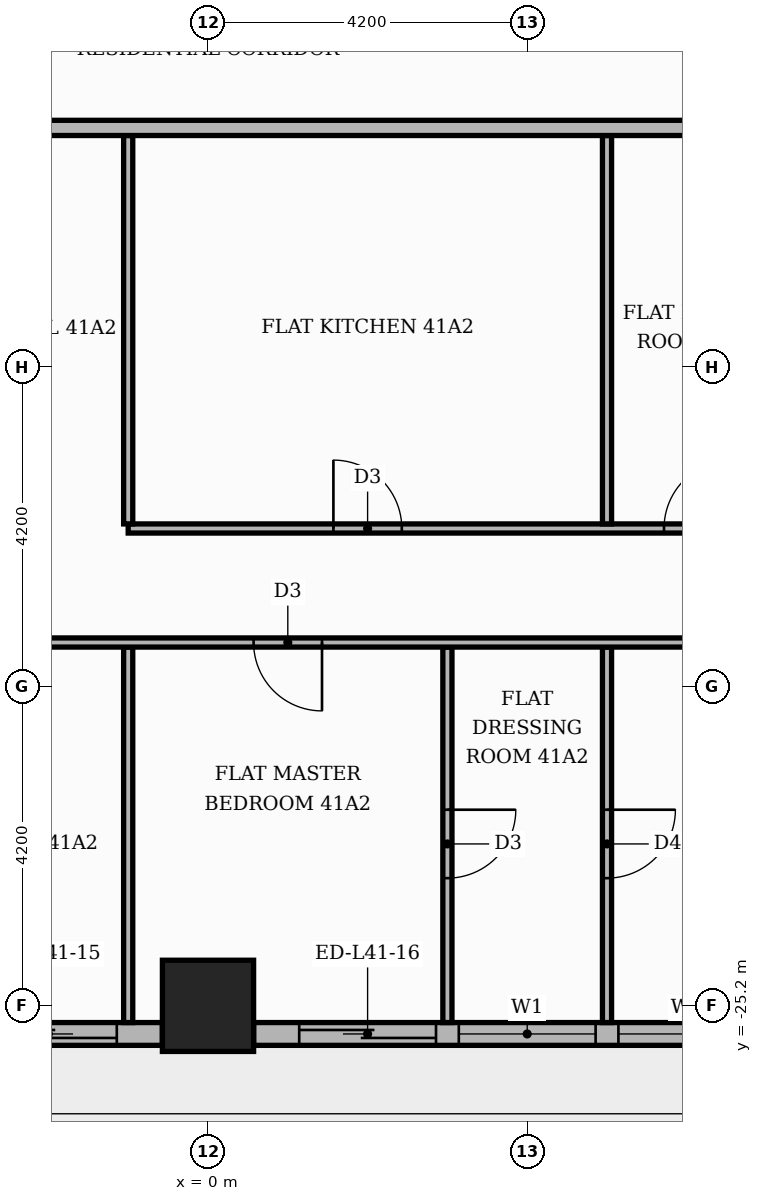
"""IFC4 building model, lengths in metres.
Left out: names, types, materials, properties, quantities, classifications, styles, units other than length and angle.
Written with IfcOpenShell. Run it as: python <this file> out.ifc"""

import sys

from ifc_helpers import new_model, si_unit, direction, frame, frame_2d, origin, origin_2d, place, context, subcontext, project, spatial, rectangle, extrude, element, fill, save


model = new_model("IFC4")
c1 = context("Model", 3, precision=1e-05, world=origin(), true_north=direction((0.0, 1.0)))
c2 = subcontext(c1, "Body", "Model", "MODEL_VIEW")
j1 = project(units=[si_unit("LENGTHUNIT", "METRE"), si_unit("PLANEANGLEUNIT", "RADIAN")], contexts=[c1])
p1 = place(None, origin())
s1 = spatial("IfcSite", under=j1, at=p1, CompositionType="ELEMENT")
p2 = place(p1, origin())
s2 = spatial("IfcBuilding", under=s1, at=p2, CompositionType="ELEMENT")
p3 = place(p2, frame((0.0, 0.0, 172.8)))
s3 = spatial("IfcBuildingStorey", under=s2, at=p3, CompositionType="ELEMENT", Elevation=172.8)
p4 = place(p3, frame((0.0, -25.2, 0.0), z_axis=(0.0, 0.0, 1.0), x_axis=(1.0, 0.0, 0.0)))
e1 = element("IfcColumn", 1, at=p4, inside=s3, PredefinedType="COLUMN", context=c2, shape_type="SweptSolid", body=[
    extrude(rectangle(XDim=1.2, YDim=1.2, at=origin_2d()), origin(), (0.0, 0.0, 1.0), 3.9),
])
p5 = place(p3, frame((-7.8, -25.57, 0.0), z_axis=(0.0, 0.0, 1.0), x_axis=(1.0, 0.0, 0.0)))
e2 = element("IfcWall", 2, at=p5, inside=s3, PredefinedType="STANDARD", context=c2, shape_type="SweptSolid", body=[
    extrude(rectangle(XDim=7.2, YDim=0.3, at=frame_2d((3.6, 0.0))), origin(), (0.0, 0.0, 1.0), 3.48),
])
p6 = place(p5, frame((0.6, 0.0, 0.9)))
e3 = element("IfcOpeningElement", 3, at=p6, cuts=e2, PredefinedType="OPENING", context=c2, shape_type="SweptSolid", body=[
    extrude(rectangle(XDim=1.8, YDim=2.1, at=frame_2d((0.9, 1.05))), frame((0.0, 0.16, 0.0), z_axis=(0.0, -1.0, 0.0), x_axis=(1.0, 0.0, 0.0)), (0.0, 0.0, 1.0), 0.32),
])
p7 = place(p5, frame((2.7, 0.0, 0.9)))
e4 = element("IfcOpeningElement", 4, at=p7, cuts=e2, PredefinedType="OPENING", context=c2, shape_type="SweptSolid", body=[
    extrude(rectangle(XDim=1.8, YDim=2.1, at=frame_2d((0.9, 1.05))), frame((0.0, 0.16, 0.0), z_axis=(0.0, -1.0, 0.0), x_axis=(1.0, 0.0, 0.0)), (0.0, 0.0, 1.0), 0.32),
])
p8 = place(p5, frame((4.8, 0.0, 0.0)))
e5 = element("IfcOpeningElement", 5, at=p8, cuts=e2, PredefinedType="OPENING", context=c2, shape_type="SweptSolid", body=[
    extrude(rectangle(XDim=1.8, YDim=2.4, at=frame_2d((0.9, 1.2))), frame((0.0, 0.16, 0.0), z_axis=(0.0, -1.0, 0.0), x_axis=(1.0, 0.0, 0.0)), (0.0, 0.0, 1.0), 0.32),
])
p9 = place(p3, frame((0.6, -25.57, 0.0), z_axis=(0.0, 0.0, 1.0), x_axis=(1.0, 0.0, 0.0)))
e6 = element("IfcWall", 6, at=p9, inside=s3, PredefinedType="STANDARD", context=c2, shape_type="SweptSolid", body=[
    extrude(rectangle(XDim=7.2, YDim=0.3, at=frame_2d((3.6, 0.0))), origin(), (0.0, 0.0, 1.0), 3.48),
])
p10 = place(p9, frame((0.6, 0.0, 0.0)))
e7 = element("IfcOpeningElement", 7, at=p10, cuts=e6, PredefinedType="OPENING", context=c2, shape_type="SweptSolid", body=[
    extrude(rectangle(XDim=1.8, YDim=2.4, at=frame_2d((0.9, 1.2))), frame((0.0, 0.16, 0.0), z_axis=(0.0, -1.0, 0.0), x_axis=(1.0, 0.0, 0.0)), (0.0, 0.0, 1.0), 0.32),
])
p11 = place(p9, frame((2.7, 0.0, 0.9)))
e8 = element("IfcOpeningElement", 8, at=p11, cuts=e6, PredefinedType="OPENING", context=c2, shape_type="SweptSolid", body=[
    extrude(rectangle(XDim=1.8, YDim=2.1, at=frame_2d((0.9, 1.05))), frame((0.0, 0.16, 0.0), z_axis=(0.0, -1.0, 0.0), x_axis=(1.0, 0.0, 0.0)), (0.0, 0.0, 1.0), 0.32),
])
p12 = place(p9, frame((4.8, 0.0, 0.9)))
e9 = element("IfcOpeningElement", 9, at=p12, cuts=e6, PredefinedType="OPENING", context=c2, shape_type="SweptSolid", body=[
    extrude(rectangle(XDim=1.8, YDim=2.1, at=frame_2d((0.9, 1.05))), frame((0.0, 0.16, 0.0), z_axis=(0.0, -1.0, 0.0), x_axis=(1.0, 0.0, 0.0)), (0.0, 0.0, 1.0), 0.32),
])
p13 = place(p3, frame((-1.05, -25.42, 0.0), z_axis=(0.0, 0.0, 1.0), x_axis=(0.0, 1.0, 0.0)))
e10 = element("IfcWall", 10, at=p13, inside=s3, PredefinedType="PARTITIONING", context=c2, shape_type="SweptSolid", body=[
    extrude(rectangle(XDim=4.94, YDim=0.12, at=frame_2d((2.47, 0.0))), origin(), (0.0, 0.0, 1.0), 3.48),
])
p14 = place(p3, frame((3.15, -25.42, 0.0), z_axis=(0.0, 0.0, 1.0), x_axis=(0.0, 1.0, 0.0)))
e11 = element("IfcWall", 11, at=p14, inside=s3, PredefinedType="PARTITIONING", context=c2, shape_type="SweptSolid", body=[
    extrude(rectangle(XDim=4.94, YDim=0.12, at=frame_2d((2.47, 0.0))), origin(), (0.0, 0.0, 1.0), 3.48),
])
p15 = place(p14, frame((1.9, 0.0, 0.0)))
e12 = element("IfcOpeningElement", 12, at=p15, cuts=e11, PredefinedType="OPENING", context=c2, shape_type="SweptSolid", body=[
    extrude(rectangle(XDim=0.9, YDim=2.1, at=frame_2d((0.45, 1.05))), frame((0.0, 0.07, 0.0), z_axis=(0.0, -1.0, 0.0), x_axis=(1.0, 0.0, 0.0)), (0.0, 0.0, 1.0), 0.14),
])
p16 = place(p3, frame((5.25, -25.42, 0.0), z_axis=(0.0, 0.0, 1.0), x_axis=(0.0, 1.0, 0.0)))
e13 = element("IfcWall", 13, at=p16, inside=s3, PredefinedType="PARTITIONING", context=c2, shape_type="SweptSolid", body=[
    extrude(rectangle(XDim=4.94, YDim=0.12, at=frame_2d((2.47, 0.0))), origin(), (0.0, 0.0, 1.0), 3.48),
])
p17 = place(p16, frame((1.9, 0.0, 0.0)))
e14 = element("IfcOpeningElement", 14, at=p17, cuts=e13, PredefinedType="OPENING", context=c2, shape_type="SweptSolid", body=[
    extrude(rectangle(XDim=0.9, YDim=2.1, at=frame_2d((0.45, 1.05))), frame((0.0, 0.07, 0.0), z_axis=(0.0, -1.0, 0.0), x_axis=(1.0, 0.0, 0.0)), (0.0, 0.0, 1.0), 0.14),
])
p18 = place(p3, frame((-5.15, -20.42, 0.0), z_axis=(0.0, 0.0, 1.0), x_axis=(1.0, 0.0, 0.0)))
e15 = element("IfcWall", 15, at=p18, inside=s3, PredefinedType="PARTITIONING", context=c2, shape_type="SweptSolid", body=[
    extrude(rectangle(XDim=18.7, YDim=0.12, at=frame_2d((9.35, 0.0))), origin(), (0.0, 0.0, 1.0), 3.48),
])
p19 = place(p18, frame((1.5, 0.0, 0.0)))
e16 = element("IfcOpeningElement", 16, at=p19, cuts=e15, PredefinedType="OPENING", context=c2, shape_type="SweptSolid", body=[
    extrude(rectangle(XDim=1.0, YDim=2.1, at=frame_2d((0.5, 1.05))), frame((0.0, 0.07, 0.0), z_axis=(0.0, -1.0, 0.0), x_axis=(1.0, 0.0, 0.0)), (0.0, 0.0, 1.0), 0.14),
])
p20 = place(p18, frame((5.75, 0.0, 0.0)))
e17 = element("IfcOpeningElement", 17, at=p20, cuts=e15, PredefinedType="OPENING", context=c2, shape_type="SweptSolid", body=[
    extrude(rectangle(XDim=0.9, YDim=2.1, at=frame_2d((0.45, 1.05))), frame((0.0, 0.07, 0.0), z_axis=(0.0, -1.0, 0.0), x_axis=(1.0, 0.0, 0.0)), (0.0, 0.0, 1.0), 0.14),
])
p21 = place(p18, frame((14.15, 0.0, 0.0)))
e18 = element("IfcOpeningElement", 18, at=p21, cuts=e15, PredefinedType="OPENING", context=c2, shape_type="SweptSolid", body=[
    extrude(rectangle(XDim=0.9, YDim=2.1, at=frame_2d((0.45, 1.05))), frame((0.0, 0.07, 0.0), z_axis=(0.0, -1.0, 0.0), x_axis=(1.0, 0.0, 0.0)), (0.0, 0.0, 1.0), 0.14),
])
p22 = place(p3, frame((-1.05, -18.92, 0.0), z_axis=(0.0, 0.0, 1.0), x_axis=(1.0, 0.0, 0.0)))
e19 = element("IfcWall", 19, at=p22, inside=s3, PredefinedType="PARTITIONING", context=c2, shape_type="SweptSolid", body=[
    extrude(rectangle(XDim=14.6, YDim=0.12, at=frame_2d((7.3, 0.0))), origin(), (0.0, 0.0, 1.0), 3.48),
])
p23 = place(p22, frame((2.7, 0.0, 0.0)))
e20 = element("IfcOpeningElement", 20, at=p23, cuts=e19, PredefinedType="OPENING", context=c2, shape_type="SweptSolid", body=[
    extrude(rectangle(XDim=0.9, YDim=2.1, at=frame_2d((0.45, 1.05))), frame((0.0, 0.07, 0.0), z_axis=(0.0, -1.0, 0.0), x_axis=(1.0, 0.0, 0.0)), (0.0, 0.0, 1.0), 0.14),
])
p24 = place(p22, frame((7.05, 0.0, 0.0)))
e21 = element("IfcOpeningElement", 21, at=p24, cuts=e19, PredefinedType="OPENING", context=c2, shape_type="SweptSolid", body=[
    extrude(rectangle(XDim=0.9, YDim=2.1, at=frame_2d((0.45, 1.05))), frame((0.0, 0.07, 0.0), z_axis=(0.0, -1.0, 0.0), x_axis=(1.0, 0.0, 0.0)), (0.0, 0.0, 1.0), 0.14),
])
p25 = place(p22, frame((10.2, 0.0, 0.0)))
e22 = element("IfcOpeningElement", 22, at=p25, cuts=e19, PredefinedType="OPENING", context=c2, shape_type="SweptSolid", body=[
    extrude(rectangle(XDim=0.9, YDim=2.1, at=frame_2d((0.45, 1.05))), frame((0.0, 0.07, 0.0), z_axis=(0.0, -1.0, 0.0), x_axis=(1.0, 0.0, 0.0)), (0.0, 0.0, 1.0), 0.14),
])
p26 = place(p22, frame((13.2, 0.0, 0.0)))
e23 = element("IfcOpeningElement", 23, at=p26, cuts=e19, PredefinedType="OPENING", context=c2, shape_type="SweptSolid", body=[
    extrude(rectangle(XDim=0.9, YDim=2.1, at=frame_2d((0.45, 1.05))), frame((0.0, 0.07, 0.0), z_axis=(0.0, -1.0, 0.0), x_axis=(1.0, 0.0, 0.0)), (0.0, 0.0, 1.0), 0.14),
])
for number, where, z_axis, x_axis in (
    (24, (-1.05, -18.86, 0.0), (0.0, 0.0, 1.0), (0.0, 1.0, 0.0)),
    (25, (5.25, -18.86, 0.0), (0.0, 0.0, 1.0), (0.0, 1.0, 0.0)),
):
    element("IfcWall", number, at=place(p3, frame(where, z_axis=z_axis, x_axis=x_axis)), inside=s3, PredefinedType="PARTITIONING", context=c2, shape_type="SweptSolid", body=[
        extrude(rectangle(XDim=5.11, YDim=0.12, at=frame_2d((2.555, 0.0))), origin(), (0.0, 0.0, 1.0), 3.48),
    ])
p27 = place(p3, frame((-25.42, -13.65, 0.0), z_axis=(0.0, 0.0, 1.0), x_axis=(1.0, 0.0, 0.0)))
e26 = element("IfcWall", 26, at=p27, inside=s3, PredefinedType="PARTITIONING", context=c2, shape_type="SweptSolid", body=[
    extrude(rectangle(XDim=39.07, YDim=0.2, at=frame_2d((19.535, 0.0))), origin(), (0.0, 0.0, 1.0), 3.48),
])
p28 = place(p27, frame((13.32, 0.0, 0.0)))
e27 = element("IfcOpeningElement", 27, at=p28, cuts=e26, PredefinedType="OPENING", context=c2, shape_type="SweptSolid", body=[
    extrude(rectangle(XDim=1.1, YDim=2.4, at=frame_2d((0.55, 1.2))), frame((0.0, 0.11, 0.0), z_axis=(0.0, -1.0, 0.0), x_axis=(1.0, 0.0, 0.0)), (0.0, 0.0, 1.0), 0.22),
])
p29 = place(p27, frame((21.72, 0.0, 0.0)))
e28 = element("IfcOpeningElement", 28, at=p29, cuts=e26, PredefinedType="OPENING", context=c2, shape_type="SweptSolid", body=[
    extrude(rectangle(XDim=1.1, YDim=2.4, at=frame_2d((0.55, 1.2))), frame((0.0, 0.11, 0.0), z_axis=(0.0, -1.0, 0.0), x_axis=(1.0, 0.0, 0.0)), (0.0, 0.0, 1.0), 0.22),
])
p30 = place(p8, origin())
e29 = element("IfcDoor", 29, at=p30, inside=s3, OperationType="SLIDING_TO_RIGHT", PredefinedType="DOOR", context=c2, shape_type="SweptSolid", body=[
    extrude(rectangle(XDim=1.8, YDim=2.4, at=frame_2d((0.9, 1.2))), frame((0.0, 0.025, 0.0), z_axis=(0.0, -1.0, 0.0), x_axis=(1.0, 0.0, 0.0)), (0.0, 0.0, 1.0), 0.05),
])
fill(e5, e29)
p31 = place(p10, origin())
e30 = element("IfcDoor", 30, at=p31, inside=s3, OperationType="SLIDING_TO_LEFT", PredefinedType="DOOR", context=c2, shape_type="SweptSolid", body=[
    extrude(rectangle(XDim=1.8, YDim=2.4, at=frame_2d((0.9, 1.2))), frame((0.0, 0.025, 0.0), z_axis=(0.0, -1.0, 0.0), x_axis=(1.0, 0.0, 0.0)), (0.0, 0.0, 1.0), 0.05),
])
fill(e7, e30)
p32 = place(p11, origin())
e31 = element("IfcWindow", 31, at=p32, inside=s3, PartitioningType="SINGLE_PANEL", PredefinedType="WINDOW", context=c2, shape_type="SweptSolid", body=[
    extrude(rectangle(XDim=1.8, YDim=2.1, at=frame_2d((0.9, 1.05))), frame((0.0, 0.03, 0.0), z_axis=(0.0, -1.0, 0.0), x_axis=(1.0, 0.0, 0.0)), (0.0, 0.0, 1.0), 0.06),
])
fill(e8, e31)
p33 = place(p12, origin())
e32 = element("IfcWindow", 32, at=p33, inside=s3, PartitioningType="SINGLE_PANEL", PredefinedType="WINDOW", context=c2, shape_type="SweptSolid", body=[
    extrude(rectangle(XDim=1.8, YDim=2.1, at=frame_2d((0.9, 1.05))), frame((0.0, 0.03, 0.0), z_axis=(0.0, -1.0, 0.0), x_axis=(1.0, 0.0, 0.0)), (0.0, 0.0, 1.0), 0.06),
])
fill(e9, e32)
p34 = place(p23, origin())
e33 = element("IfcDoor", 33, at=p34, inside=s3, OperationType="SINGLE_SWING_LEFT", PredefinedType="DOOR", context=c2, shape_type="SweptSolid", body=[
    extrude(rectangle(XDim=0.9, YDim=2.1, at=frame_2d((0.45, 1.05))), frame((0.0, 0.025, 0.0), z_axis=(0.0, -1.0, 0.0), x_axis=(1.0, 0.0, 0.0)), (0.0, 0.0, 1.0), 0.05),
])
fill(e20, e33)
p35 = place(p24, origin())
e34 = element("IfcDoor", 34, at=p35, inside=s3, OperationType="SINGLE_SWING_RIGHT", PredefinedType="DOOR", context=c2, shape_type="SweptSolid", body=[
    extrude(rectangle(XDim=0.9, YDim=2.1, at=frame_2d((0.45, 1.05))), frame((0.0, 0.025, 0.0), z_axis=(0.0, -1.0, 0.0), x_axis=(1.0, 0.0, 0.0)), (0.0, 0.0, 1.0), 0.05),
])
fill(e21, e34)
p36 = place(p20, frame((0.9, 0.0, 0.0), z_axis=(0.0, 0.0, 1.0), x_axis=(-1.0, 0.0, 0.0)))
e35 = element("IfcDoor", 35, at=p36, inside=s3, OperationType="SINGLE_SWING_RIGHT", PredefinedType="DOOR", context=c2, shape_type="SweptSolid", body=[
    extrude(rectangle(XDim=0.9, YDim=2.1, at=frame_2d((0.45, 1.05))), frame((0.0, 0.025, 0.0), z_axis=(0.0, -1.0, 0.0), x_axis=(1.0, 0.0, 0.0)), (0.0, 0.0, 1.0), 0.05),
])
fill(e17, e35)
p37 = place(p15, frame((0.9, 0.0, 0.0), z_axis=(0.0, 0.0, 1.0), x_axis=(-1.0, 0.0, 0.0)))
e36 = element("IfcDoor", 36, at=p37, inside=s3, OperationType="SINGLE_SWING_RIGHT", PredefinedType="DOOR", context=c2, shape_type="SweptSolid", body=[
    extrude(rectangle(XDim=0.9, YDim=2.1, at=frame_2d((0.45, 1.05))), frame((0.0, 0.025, 0.0), z_axis=(0.0, -1.0, 0.0), x_axis=(1.0, 0.0, 0.0)), (0.0, 0.0, 1.0), 0.05),
])
fill(e12, e36)
p38 = place(p17, frame((0.9, 0.0, 0.0), z_axis=(0.0, 0.0, 1.0), x_axis=(-1.0, 0.0, 0.0)))
e37 = element("IfcDoor", 37, at=p38, inside=s3, OperationType="SINGLE_SWING_RIGHT", PredefinedType="DOOR", context=c2, shape_type="SweptSolid", body=[
    extrude(rectangle(XDim=0.9, YDim=2.1, at=frame_2d((0.45, 1.05))), frame((0.0, 0.025, 0.0), z_axis=(0.0, -1.0, 0.0), x_axis=(1.0, 0.0, 0.0)), (0.0, 0.0, 1.0), 0.05),
])
fill(e14, e37)
save(model, sys.argv[1])
